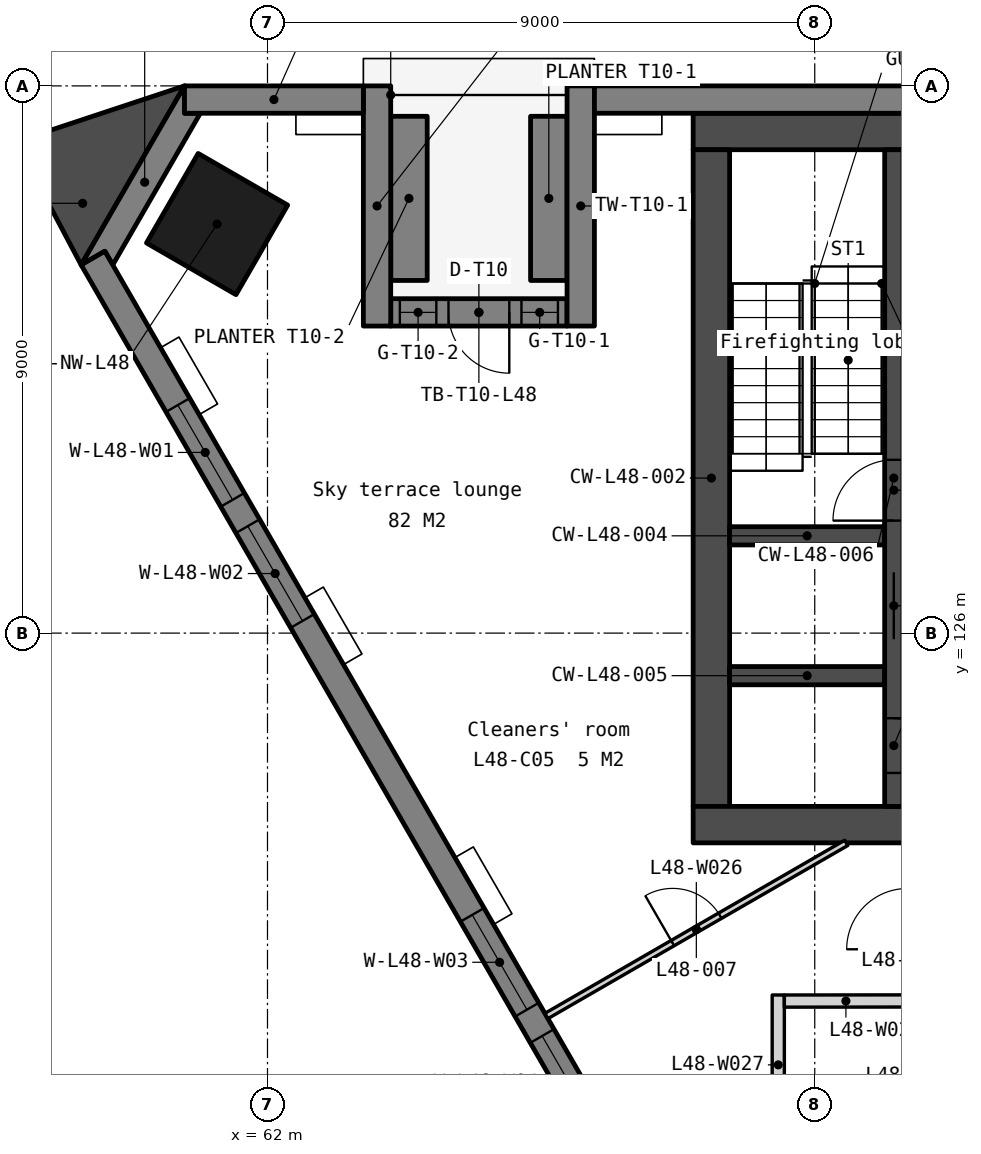
"""IFC4 building model, lengths in metres.
Left out: names, types, materials, properties, quantities, classifications, styles, units other than length and angle.
Written with IfcOpenShell. Run it as: python <this file> out.ifc"""

import sys

from ifc_helpers import new_model, si_unit, direction, frame, frame_2d, origin, origin_2d, place, context, subcontext, project, spatial, polyline, rectangle, outline, extrude, element, fill, save


model = new_model("IFC4")
c1 = context("Model", 3, precision=1e-05, world=origin(), true_north=direction((0.0, 1.0)))
c2 = subcontext(c1, "Body", "Model", "MODEL_VIEW")
j1 = project(units=[si_unit("LENGTHUNIT", "METRE"), si_unit("PLANEANGLEUNIT", "RADIAN")], contexts=[c1])
p1 = place(None, origin())
s1 = spatial("IfcSite", under=j1, at=p1, CompositionType="ELEMENT")
p2 = place(p1, origin())
s2 = spatial("IfcBuilding", under=s1, at=p2, CompositionType="ELEMENT")
p3 = place(p2, frame((0.0, 0.0, 191.9)))
s3 = spatial("IfcBuildingStorey", under=s2, at=p3, CompositionType="ELEMENT", Elevation=191.9)
p4 = place(p3, frame((61.171, 132.728, 0.0), z_axis=(0.0, 0.0, 1.0), x_axis=(-0.5, -0.866025403784, 0.0)))
e1 = element("IfcColumn", 1, at=p4, inside=s3, PredefinedType="COLUMN", context=c2, shape_type="SweptSolid", body=[
    extrude(rectangle(XDim=1.7, YDim=1.7, at=origin_2d()), origin(), (0.0, 0.0, 1.0), 3.9),
])
p5 = place(p3, frame((69.0, 134.25, 0.0), z_axis=(0.0, 0.0, 1.0), x_axis=(1.0, 0.0, 0.0)))
e2 = element("IfcWall", 2, at=p5, inside=s3, PredefinedType="SOLIDWALL", context=c2, shape_type="SweptSolid", body=[
    extrude(rectangle(XDim=22.0, YDim=0.6, at=frame_2d((11.0, 0.0))), origin(), (0.0, 0.0, 1.0), 3.75),
])
p6 = place(p3, frame((69.3, 133.95, 0.0), z_axis=(0.0, 0.0, 1.0), x_axis=(0.0, -1.0, 0.0)))
e3 = element("IfcWall", 3, at=p6, inside=s3, PredefinedType="SOLIDWALL", context=c2, shape_type="SweptSolid", body=[
    extrude(rectangle(XDim=10.8, YDim=0.6, at=frame_2d((5.4, 0.0))), origin(), (0.0, 0.0, 1.0), 3.75),
])
p7 = place(p3, frame((69.0, 122.85, 0.0), z_axis=(0.0, 0.0, 1.0), x_axis=(1.0, 0.0, 0.0)))
e4 = element("IfcWall", 4, at=p7, inside=s3, PredefinedType="SOLIDWALL", context=c2, shape_type="SweptSolid", body=[
    extrude(rectangle(XDim=22.0, YDim=0.6, at=frame_2d((11.0, 0.0))), origin(), (0.0, 0.0, 1.0), 3.75),
])
p8 = place(p7, frame((16.375, 0.0, 0.0)))
e5 = element("IfcOpeningElement", 5, at=p8, cuts=e4, PredefinedType="OPENING", context=c2, shape_type="SweptSolid", body=[
    extrude(rectangle(XDim=1.8, YDim=2.1, at=frame_2d((0.9, 1.05))), frame((0.0, 0.31, 0.0), z_axis=(0.0, -1.0, 0.0), x_axis=(1.0, 0.0, 0.0)), (0.0, 0.0, 1.0), 0.62),
])
p9 = place(p7, frame((3.825, 0.0, 0.0)))
e6 = element("IfcOpeningElement", 6, at=p9, cuts=e4, PredefinedType="OPENING", context=c2, shape_type="SweptSolid", body=[
    extrude(rectangle(XDim=1.8, YDim=2.1, at=frame_2d((0.9, 1.05))), frame((0.0, 0.31, 0.0), z_axis=(0.0, -1.0, 0.0), x_axis=(1.0, 0.0, 0.0)), (0.0, 0.0, 1.0), 0.62),
])
p10 = place(p7, frame((12.85, 0.0, 0.0)))
e7 = element("IfcOpeningElement", 7, at=p10, cuts=e4, PredefinedType="OPENING", context=c2, shape_type="SweptSolid", body=[
    extrude(rectangle(XDim=1.5, YDim=2.1, at=frame_2d((0.75, 1.05))), frame((0.0, 0.31, 0.0), z_axis=(0.0, -1.0, 0.0), x_axis=(1.0, 0.0, 0.0)), (0.0, 0.0, 1.0), 0.62),
])
for number, where, z_axis, x_axis in (
    (8, (69.6, 127.6, 0.0), (0.0, 0.0, 1.0), (1.0, 0.0, 0.0)),
    (9, (69.6, 125.3, 0.0), (0.0, 0.0, 1.0), (1.0, 0.0, 0.0)),
):
    element("IfcWall", number, at=place(p3, frame(where, z_axis=z_axis, x_axis=x_axis)), inside=s3, PredefinedType="SOLIDWALL", context=c2, shape_type="SweptSolid", body=[
        extrude(rectangle(XDim=2.55, YDim=0.3, at=frame_2d((1.275, 0.0))), origin(), (0.0, 0.0, 1.0), 3.75),
    ])
p11 = place(p3, frame((72.3, 133.95, 0.0), z_axis=(0.0, 0.0, 1.0), x_axis=(0.0, -1.0, 0.0)))
e10 = element("IfcWall", 10, at=p11, inside=s3, PredefinedType="SOLIDWALL", context=c2, shape_type="SweptSolid", body=[
    extrude(rectangle(XDim=10.8, YDim=0.3, at=frame_2d((5.4, 0.0))), origin(), (0.0, 0.0, 1.0), 3.75),
])
p12 = place(p11, frame((6.95, 0.0, 0.0)))
e11 = element("IfcOpeningElement", 11, at=p12, cuts=e10, PredefinedType="OPENING", context=c2, shape_type="SweptSolid", body=[
    extrude(rectangle(XDim=1.1, YDim=2.1, at=frame_2d((0.55, 1.05))), frame((0.0, 0.16, 0.0), z_axis=(0.0, -1.0, 0.0), x_axis=(1.0, 0.0, 0.0)), (0.0, 0.0, 1.0), 0.32),
])
p13 = place(p11, frame((9.35, 0.0, 0.0)))
e12 = element("IfcOpeningElement", 12, at=p13, cuts=e10, PredefinedType="OPENING", context=c2, shape_type="SweptSolid", body=[
    extrude(rectangle(XDim=0.9, YDim=2.1, at=frame_2d((0.45, 1.05))), frame((0.0, 0.16, 0.0), z_axis=(0.0, -1.0, 0.0), x_axis=(1.0, 0.0, 0.0)), (0.0, 0.0, 1.0), 0.32),
])
p14 = place(p11, frame((5.1, 0.0, 0.0)))
e13 = element("IfcOpeningElement", 13, at=p14, cuts=e10, PredefinedType="OPENING", context=c2, shape_type="SweptSolid", body=[
    extrude(rectangle(XDim=1.0, YDim=2.1, at=frame_2d((0.5, 1.05))), frame((0.0, 0.16, 0.0), z_axis=(0.0, -1.0, 0.0), x_axis=(1.0, 0.0, 0.0)), (0.0, 0.0, 1.0), 0.32),
])
p15 = place(p3, frame((0.0, 0.0, -0.15)))
e14 = element("IfcWall", 14, at=p15, inside=s3, PredefinedType="SOLIDWALL", context=c2, shape_type="SweptSolid", body=[
    extrude(outline(polyline([(60.635, 135.0), (60.635, 134.55), (60.895, 134.55), (59.455, 132.055), (59.325, 132.281), (58.935, 132.055), (60.635, 135.0)])), origin(), (0.0, 0.0, 1.0), 3.9),
])
p16 = place(p3, frame((99.365, 134.775, -0.15), z_axis=(0.0, 0.0, 1.0), x_axis=(-1.0, 0.0, 0.0)))
e15 = element("IfcWall", 15, at=p16, inside=s3, PredefinedType="SOLIDWALL", context=c2, shape_type="SweptSolid", body=[
    extrude(outline(polyline([(0.0, 0.0), (0.0, 3.9), (31.988, 3.9), (31.988, 0.0), (0.0, 0.0)])), frame((0.0, 0.225, 0.0), z_axis=(0.0, -1.0, 0.0), x_axis=(1.0, 0.0, 0.0)), (0.0, 0.0, 1.0), 0.45),
])
p17 = place(p16, frame((2.791, 0.0, 0.95)))
e16 = element("IfcOpeningElement", 16, at=p17, cuts=e15, PredefinedType="OPENING", context=c2, shape_type="SweptSolid", body=[
    extrude(rectangle(XDim=1.8, YDim=2.2, at=frame_2d((0.9, 1.1))), frame((0.0, 0.235, 0.0), z_axis=(0.0, -1.0, 0.0), x_axis=(1.0, 0.0, 0.0)), (0.0, 0.0, 1.0), 0.47),
])
p18 = place(p16, frame((5.091, 0.0, 0.95)))
e17 = element("IfcOpeningElement", 17, at=p18, cuts=e15, PredefinedType="OPENING", context=c2, shape_type="SweptSolid", body=[
    extrude(rectangle(XDim=1.8, YDim=2.2, at=frame_2d((0.9, 1.1))), frame((0.0, 0.235, 0.0), z_axis=(0.0, -1.0, 0.0), x_axis=(1.0, 0.0, 0.0)), (0.0, 0.0, 1.0), 0.47),
])
p19 = place(p16, frame((12.473, 0.0, 0.95)))
e18 = element("IfcOpeningElement", 18, at=p19, cuts=e15, PredefinedType="OPENING", context=c2, shape_type="SweptSolid", body=[
    extrude(rectangle(XDim=1.8, YDim=2.2, at=frame_2d((0.9, 1.1))), frame((0.0, 0.235, 0.0), z_axis=(0.0, -1.0, 0.0), x_axis=(1.0, 0.0, 0.0)), (0.0, 0.0, 1.0), 0.47),
])
p20 = place(p16, frame((14.773, 0.0, 0.95)))
e19 = element("IfcOpeningElement", 19, at=p20, cuts=e15, PredefinedType="OPENING", context=c2, shape_type="SweptSolid", body=[
    extrude(rectangle(XDim=1.8, YDim=2.2, at=frame_2d((0.9, 1.1))), frame((0.0, 0.235, 0.0), z_axis=(0.0, -1.0, 0.0), x_axis=(1.0, 0.0, 0.0)), (0.0, 0.0, 1.0), 0.47),
])
p21 = place(p16, frame((22.156, 0.0, 0.95)))
e20 = element("IfcOpeningElement", 20, at=p21, cuts=e15, PredefinedType="OPENING", context=c2, shape_type="SweptSolid", body=[
    extrude(rectangle(XDim=1.8, YDim=2.2, at=frame_2d((0.9, 1.1))), frame((0.0, 0.235, 0.0), z_axis=(0.0, -1.0, 0.0), x_axis=(1.0, 0.0, 0.0)), (0.0, 0.0, 1.0), 0.47),
])
p22 = place(p16, frame((24.456, 0.0, 0.95)))
e21 = element("IfcOpeningElement", 21, at=p22, cuts=e15, PredefinedType="OPENING", context=c2, shape_type="SweptSolid", body=[
    extrude(rectangle(XDim=1.8, YDim=2.2, at=frame_2d((0.9, 1.1))), frame((0.0, 0.235, 0.0), z_axis=(0.0, -1.0, 0.0), x_axis=(1.0, 0.0, 0.0)), (0.0, 0.0, 1.0), 0.47),
])
p23 = place(p3, frame((63.576, 134.775, -0.15), z_axis=(0.0, 0.0, 1.0), x_axis=(-1.0, 0.0, 0.0)))
e22 = element("IfcWall", 22, at=p23, inside=s3, PredefinedType="SOLIDWALL", context=c2, shape_type="SweptSolid", body=[
    extrude(outline(polyline([(2.941, 3.9), (2.941, 0.0), (0.0, 0.0), (0.0, 3.9), (2.941, 3.9)])), frame((0.0, 0.225, 0.0), z_axis=(0.0, -1.0, 0.0), x_axis=(1.0, 0.0, 0.0)), (0.0, 0.0, 1.0), 0.45),
])
p24 = place(p3, frame((59.13, 132.168, -0.15), z_axis=(0.0, 0.0, 1.0), x_axis=(0.500002199942, -0.866024133644, 0.0)))
e23 = element("IfcWall", 23, at=p24, inside=s3, PredefinedType="SOLIDWALL", context=c2, shape_type="SweptSolid", body=[
    extrude(outline(polyline([(38.729, 0.0), (38.729, 3.9), (0.0, 3.9), (0.0, 0.0), (38.729, 0.0)])), frame((0.0, 0.225, 0.0), z_axis=(0.0, -1.0, 0.0), x_axis=(1.0, 0.0, 0.0)), (0.0, 0.0, 1.0), 0.45),
])
p25 = place(p24, frame((2.791, 0.0, 0.95)))
e24 = element("IfcOpeningElement", 24, at=p25, cuts=e23, PredefinedType="OPENING", context=c2, shape_type="SweptSolid", body=[
    extrude(rectangle(XDim=1.8, YDim=2.2, at=frame_2d((0.9, 1.1))), frame((0.0, 0.235, 0.0), z_axis=(0.0, -1.0, 0.0), x_axis=(1.0, 0.0, 0.0)), (0.0, 0.0, 1.0), 0.47),
])
p26 = place(p24, frame((5.091, 0.0, 0.95)))
e25 = element("IfcOpeningElement", 25, at=p26, cuts=e23, PredefinedType="OPENING", context=c2, shape_type="SweptSolid", body=[
    extrude(rectangle(XDim=1.8, YDim=2.2, at=frame_2d((0.9, 1.1))), frame((0.0, 0.235, 0.0), z_axis=(0.0, -1.0, 0.0), x_axis=(1.0, 0.0, 0.0)), (0.0, 0.0, 1.0), 0.47),
])
p27 = place(p24, frame((12.473, 0.0, 0.95)))
e26 = element("IfcOpeningElement", 26, at=p27, cuts=e23, PredefinedType="OPENING", context=c2, shape_type="SweptSolid", body=[
    extrude(rectangle(XDim=1.8, YDim=2.2, at=frame_2d((0.9, 1.1))), frame((0.0, 0.235, 0.0), z_axis=(0.0, -1.0, 0.0), x_axis=(1.0, 0.0, 0.0)), (0.0, 0.0, 1.0), 0.47),
])
p28 = place(p24, frame((14.773, 0.0, 0.95)))
e27 = element("IfcOpeningElement", 27, at=p28, cuts=e23, PredefinedType="OPENING", context=c2, shape_type="SweptSolid", body=[
    extrude(rectangle(XDim=1.8, YDim=2.2, at=frame_2d((0.9, 1.1))), frame((0.0, 0.235, 0.0), z_axis=(0.0, -1.0, 0.0), x_axis=(1.0, 0.0, 0.0)), (0.0, 0.0, 1.0), 0.47),
])
p29 = place(p24, frame((22.156, 0.0, 0.95)))
e28 = element("IfcOpeningElement", 28, at=p29, cuts=e23, PredefinedType="OPENING", context=c2, shape_type="SweptSolid", body=[
    extrude(rectangle(XDim=1.8, YDim=2.2, at=frame_2d((0.9, 1.1))), frame((0.0, 0.235, 0.0), z_axis=(0.0, -1.0, 0.0), x_axis=(1.0, 0.0, 0.0)), (0.0, 0.0, 1.0), 0.47),
])
p30 = place(p24, frame((24.456, 0.0, 0.95)))
e29 = element("IfcOpeningElement", 29, at=p30, cuts=e23, PredefinedType="OPENING", context=c2, shape_type="SweptSolid", body=[
    extrude(rectangle(XDim=1.8, YDim=2.2, at=frame_2d((0.9, 1.1))), frame((0.0, 0.235, 0.0), z_axis=(0.0, -1.0, 0.0), x_axis=(1.0, 0.0, 0.0)), (0.0, 0.0, 1.0), 0.47),
])
p31 = place(p24, frame((31.838, 0.0, 0.95)))
e30 = element("IfcOpeningElement", 30, at=p31, cuts=e23, PredefinedType="OPENING", context=c2, shape_type="SweptSolid", body=[
    extrude(rectangle(XDim=1.8, YDim=2.2, at=frame_2d((0.9, 1.1))), frame((0.0, 0.235, 0.0), z_axis=(0.0, -1.0, 0.0), x_axis=(1.0, 0.0, 0.0)), (0.0, 0.0, 1.0), 0.47),
])
p32 = place(p24, frame((34.138, 0.0, 0.95)))
e31 = element("IfcOpeningElement", 31, at=p32, cuts=e23, PredefinedType="OPENING", context=c2, shape_type="SweptSolid", body=[
    extrude(rectangle(XDim=1.8, YDim=2.2, at=frame_2d((0.9, 1.1))), frame((0.0, 0.235, 0.0), z_axis=(0.0, -1.0, 0.0), x_axis=(1.0, 0.0, 0.0)), (0.0, 0.0, 1.0), 0.47),
])
for number, where, z_axis, x_axis in (
    (32, (67.152, 135.0, 0.0), (0.0, 0.0, 1.0), (0.0, -1.0, 0.0)),
    (33, (63.802, 135.0, 0.0), (0.0, 0.0, 1.0), (0.0, -1.0, 0.0)),
):
    element("IfcWall", number, at=place(p3, frame(where, z_axis=z_axis, x_axis=x_axis)), inside=s3, PredefinedType="SOLIDWALL", context=c2, shape_type="SweptSolid", body=[
        extrude(rectangle(XDim=3.95, YDim=0.45, at=frame_2d((1.975, 0.0))), origin(), (0.0, 0.0, 1.0), 3.29),
    ])
p33 = place(p3, frame((66.927, 131.275, -0.15), z_axis=(0.0, 0.0, 1.0), x_axis=(-1.0, 0.0, 0.0)))
e34 = element("IfcWall", 34, at=p33, inside=s3, PredefinedType="SOLIDWALL", context=c2, shape_type="SweptSolid", body=[
    extrude(rectangle(XDim=2.9, YDim=0.45, at=frame_2d((1.45, 0.0))), origin(), (0.0, 0.0, 1.0), 3.44),
])
p34 = place(p33, frame((0.95, 0.0, 0.15)))
e35 = element("IfcOpeningElement", 35, at=p34, cuts=e34, PredefinedType="OPENING", context=c2, shape_type="SweptSolid", body=[
    extrude(rectangle(XDim=1.0, YDim=2.4, at=frame_2d((0.5, 1.2))), frame((0.0, 0.235, 0.0), z_axis=(0.0, -1.0, 0.0), x_axis=(1.0, 0.0, 0.0)), (0.0, 0.0, 1.0), 0.47),
])
p35 = place(p33, frame((0.15, 0.0, 0.15)))
e36 = element("IfcOpeningElement", 36, at=p35, cuts=e34, PredefinedType="OPENING", context=c2, shape_type="SweptSolid", body=[
    extrude(rectangle(XDim=0.6, YDim=2.4, at=frame_2d((0.3, 1.2))), frame((0.0, 0.235, 0.0), z_axis=(0.0, -1.0, 0.0), x_axis=(1.0, 0.0, 0.0)), (0.0, 0.0, 1.0), 0.47),
])
p36 = place(p33, frame((2.15, 0.0, 0.15)))
e37 = element("IfcOpeningElement", 37, at=p36, cuts=e34, PredefinedType="OPENING", context=c2, shape_type="SweptSolid", body=[
    extrude(rectangle(XDim=0.6, YDim=2.4, at=frame_2d((0.3, 1.2))), frame((0.0, 0.235, 0.0), z_axis=(0.0, -1.0, 0.0), x_axis=(1.0, 0.0, 0.0)), (0.0, 0.0, 1.0), 0.47),
])
for number, where, z_axis, x_axis in (
    (38, (66.626, 134.5, 0.0), (0.0, 0.0, 1.0), (0.0, -1.0, 0.0)),
    (39, (64.326, 134.5, 0.0), (0.0, 0.0, 1.0), (0.0, -1.0, 0.0)),
):
    element("IfcWall", number, at=place(p3, frame(where, z_axis=z_axis, x_axis=x_axis)), inside=s3, PredefinedType="STANDARD", context=c2, shape_type="SweptSolid", body=[
        extrude(rectangle(XDim=2.7, YDim=0.6, at=frame_2d((1.35, 0.0))), origin(), (0.0, 0.0, 1.0), 0.6),
    ])
p37 = place(p3, frame((0.0, 0.0, -0.15)))
e40 = element("IfcWall", 40, at=p37, inside=s3, PredefinedType="SOLIDWALL", context=c2, shape_type="SweptSolid", body=[
    extrude(outline(polyline([(60.635, 135.0), (57.862, 134.082), (58.935, 132.055), (60.635, 135.0)])), origin(), (0.0, 0.0, 1.0), 3.9),
])
p38 = place(p3, frame((66.587, 119.703, 0.0), z_axis=(0.0, 0.0, 1.0), x_axis=(0.866023511746, 0.500003277092, 0.0)))
e41 = element("IfcWall", 41, at=p38, inside=s3, PredefinedType="PARTITIONING", context=c2, shape_type="SweptSolid", body=[
    extrude(rectangle(XDim=5.694, YDim=0.1, at=frame_2d((2.847, 0.0))), origin(), (0.0, 0.0, 1.0), 3.75),
])
p39 = place(p38, frame((2.397, 0.0, 0.0)))
e42 = element("IfcOpeningElement", 42, at=p39, cuts=e41, PredefinedType="OPENING", context=c2, shape_type="SweptSolid", body=[
    extrude(rectangle(XDim=0.9, YDim=2.1, at=frame_2d((0.45, 1.05))), frame((0.0, 0.06, 0.0), z_axis=(0.0, -1.0, 0.0), x_axis=(1.0, 0.0, 0.0)), (0.0, 0.0, 1.0), 0.12),
])
p40 = place(p3, frame((70.4, 117.75, 0.0), z_axis=(0.0, 0.0, 1.0), x_axis=(0.0, 1.0, 0.0)))
e43 = element("IfcWall", 43, at=p40, inside=s3, PredefinedType="PARTITIONING", context=c2, shape_type="SweptSolid", body=[
    extrude(rectangle(XDim=2.298, YDim=0.2, at=frame_2d((1.149, 0.0))), origin(), (0.0, 0.0, 1.0), 3.75),
])
p41 = place(p3, frame((70.5, 119.948, 0.0), z_axis=(0.0, 0.0, 1.0), x_axis=(0.999999534819, 0.00096455224, 0.0)))
e44 = element("IfcWall", 44, at=p41, inside=s3, PredefinedType="PARTITIONING", context=c2, shape_type="SweptSolid", body=[
    extrude(rectangle(XDim=2.025, YDim=0.2, at=frame_2d((1.012, 0.0))), origin(), (0.0, 0.0, 1.0), 3.75),
])
p42 = place(p12, origin())
e45 = element("IfcDoor", 45, at=p42, inside=s3, OperationType="SLIDING_TO_LEFT", PredefinedType="DOOR", context=c2, shape_type="SweptSolid", body=[
    extrude(rectangle(XDim=1.1, YDim=2.1, at=frame_2d((0.55, 1.05))), frame((0.0, 0.025, 0.0), z_axis=(0.0, -1.0, 0.0), x_axis=(1.0, 0.0, 0.0)), (0.0, 0.0, 1.0), 0.05),
])
fill(e11, e45)
p43 = place(p13, origin())
e46 = element("IfcDoor", 46, at=p43, inside=s3, OperationType="SINGLE_SWING_LEFT", PredefinedType="DOOR", context=c2, shape_type="SweptSolid", body=[
    extrude(rectangle(XDim=0.9, YDim=2.1, at=frame_2d((0.45, 1.05))), frame((0.0, 0.025, 0.0), z_axis=(0.0, -1.0, 0.0), x_axis=(1.0, 0.0, 0.0)), (0.0, 0.0, 1.0), 0.05),
])
fill(e12, e46)
p44 = place(p14, origin())
e47 = element("IfcDoor", 47, at=p44, inside=s3, OperationType="SINGLE_SWING_RIGHT", PredefinedType="DOOR", context=c2, shape_type="SweptSolid", body=[
    extrude(rectangle(XDim=1.0, YDim=2.1, at=frame_2d((0.5, 1.05))), frame((0.0, 0.025, 0.0), z_axis=(0.0, -1.0, 0.0), x_axis=(1.0, 0.0, 0.0)), (0.0, 0.0, 1.0), 0.05),
])
fill(e13, e47)
p45 = place(p25, origin())
e48 = element("IfcWindow", 48, at=p45, inside=s3, PartitioningType="SINGLE_PANEL", PredefinedType="WINDOW", context=c2, shape_type="SweptSolid", body=[
    extrude(rectangle(XDim=1.8, YDim=2.2, at=frame_2d((0.9, 1.1))), frame((0.0, 0.03, 0.0), z_axis=(0.0, -1.0, 0.0), x_axis=(1.0, 0.0, 0.0)), (0.0, 0.0, 1.0), 0.06),
])
fill(e24, e48)
p46 = place(p26, origin())
e49 = element("IfcWindow", 49, at=p46, inside=s3, PartitioningType="SINGLE_PANEL", PredefinedType="WINDOW", context=c2, shape_type="SweptSolid", body=[
    extrude(rectangle(XDim=1.8, YDim=2.2, at=frame_2d((0.9, 1.1))), frame((0.0, 0.03, 0.0), z_axis=(0.0, -1.0, 0.0), x_axis=(1.0, 0.0, 0.0)), (0.0, 0.0, 1.0), 0.06),
])
fill(e25, e49)
p47 = place(p27, origin())
e50 = element("IfcWindow", 50, at=p47, inside=s3, PartitioningType="SINGLE_PANEL", PredefinedType="WINDOW", context=c2, shape_type="SweptSolid", body=[
    extrude(rectangle(XDim=1.8, YDim=2.2, at=frame_2d((0.9, 1.1))), frame((0.0, 0.03, 0.0), z_axis=(0.0, -1.0, 0.0), x_axis=(1.0, 0.0, 0.0)), (0.0, 0.0, 1.0), 0.06),
])
fill(e26, e50)
p48 = place(p28, origin())
e51 = element("IfcWindow", 51, at=p48, inside=s3, PartitioningType="SINGLE_PANEL", PredefinedType="WINDOW", context=c2, shape_type="SweptSolid", body=[
    extrude(rectangle(XDim=1.8, YDim=2.2, at=frame_2d((0.9, 1.1))), frame((0.0, 0.03, 0.0), z_axis=(0.0, -1.0, 0.0), x_axis=(1.0, 0.0, 0.0)), (0.0, 0.0, 1.0), 0.06),
])
fill(e27, e51)
p49 = place(p34, origin())
e52 = element("IfcDoor", 52, at=p49, inside=s3, OperationType="SINGLE_SWING_LEFT", PredefinedType="DOOR", context=c2, shape_type="SweptSolid", body=[
    extrude(rectangle(XDim=1.0, YDim=2.4, at=frame_2d((0.5, 1.2))), frame((0.0, 0.025, 0.0), z_axis=(0.0, -1.0, 0.0), x_axis=(1.0, 0.0, 0.0)), (0.0, 0.0, 1.0), 0.05),
])
fill(e35, e52)
p50 = place(p35, origin())
e53 = element("IfcWindow", 53, at=p50, inside=s3, PartitioningType="SINGLE_PANEL", PredefinedType="WINDOW", context=c2, shape_type="SweptSolid", body=[
    extrude(rectangle(XDim=0.6, YDim=2.4, at=frame_2d((0.3, 1.2))), frame((0.0, 0.03, 0.0), z_axis=(0.0, -1.0, 0.0), x_axis=(1.0, 0.0, 0.0)), (0.0, 0.0, 1.0), 0.06),
])
fill(e36, e53)
p51 = place(p36, origin())
e54 = element("IfcWindow", 54, at=p51, inside=s3, PartitioningType="SINGLE_PANEL", PredefinedType="WINDOW", context=c2, shape_type="SweptSolid", body=[
    extrude(rectangle(XDim=0.6, YDim=2.4, at=frame_2d((0.3, 1.2))), frame((0.0, 0.03, 0.0), z_axis=(0.0, -1.0, 0.0), x_axis=(1.0, 0.0, 0.0)), (0.0, 0.0, 1.0), 0.06),
])
fill(e37, e54)
p52 = place(p39, origin())
e55 = element("IfcDoor", 55, at=p52, inside=s3, OperationType="SINGLE_SWING_LEFT", PredefinedType="DOOR", context=c2, shape_type="SweptSolid", body=[
    extrude(rectangle(XDim=0.9, YDim=2.1, at=frame_2d((0.45, 1.05))), frame((0.0, 0.025, 0.0), z_axis=(0.0, -1.0, 0.0), x_axis=(1.0, 0.0, 0.0)), (0.0, 0.0, 1.0), 0.05),
])
fill(e42, e55)
save(model, sys.argv[1])
